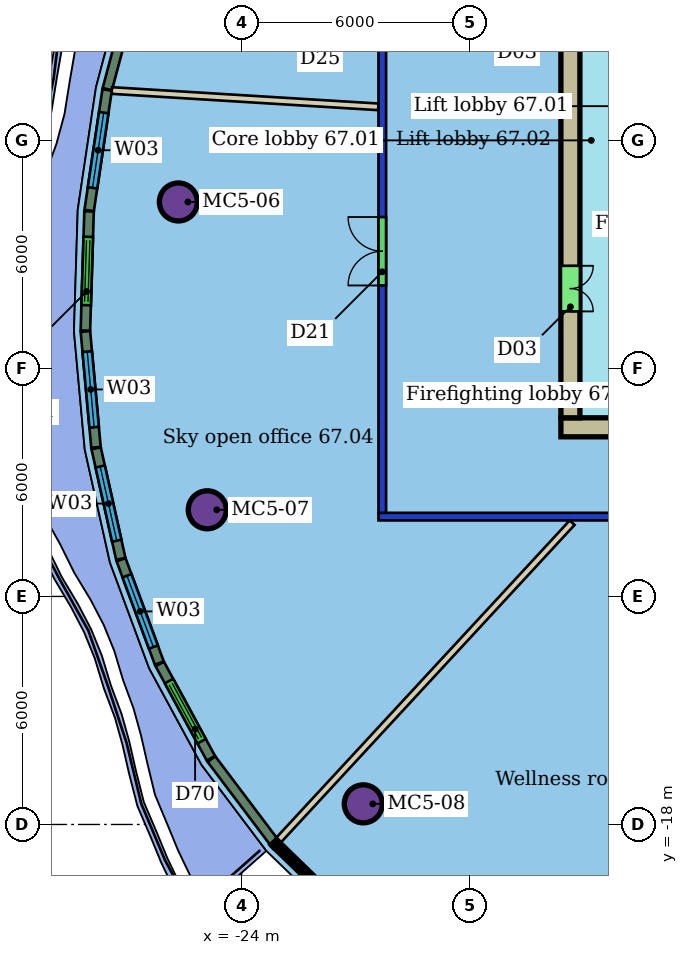
"""IFC4 building model, lengths in metres.
Left out: names, types, materials, properties, quantities, classifications, styles, units other than length and angle.
Written with IfcOpenShell. Run it as: python <this file> out.ifc"""

import sys

from ifc_helpers import new_model, si_unit, direction, frame, frame_2d, origin, origin_2d, place, context, subcontext, project, spatial, rectangle, hollow_circle, extrude, element, fill, save


model = new_model("IFC4")
c1 = context("Model", 3, precision=1e-05, world=origin(), true_north=direction((0.0, 1.0)))
c2 = subcontext(c1, "Body", "Model", "MODEL_VIEW")
j1 = project(units=[si_unit("LENGTHUNIT", "METRE"), si_unit("PLANEANGLEUNIT", "RADIAN")], contexts=[c1])
p1 = place(None, origin())
s1 = spatial("IfcSite", under=j1, at=p1, CompositionType="ELEMENT")
p2 = place(p1, origin())
s2 = spatial("IfcBuilding", under=s1, at=p2, CompositionType="ELEMENT")
p3 = place(p2, frame((0.0, 0.0, 272.1)))
s3 = spatial("IfcBuildingStorey", under=s2, at=p3, CompositionType="ELEMENT", Elevation=272.1)
for number, where, z_axis, x_axis in (
    (1, (-25.666, -1.62, 0.0), (0.0, 0.0, 1.0), (1.0, 0.0, 0.0)),
    (2, (-24.906, -9.72, 0.0), (0.0, 0.0, 1.0), (1.0, 0.0, 0.0)),
    (3, (-20.8, -17.457, 0.0), (0.0, 0.0, 1.0), (1.0, 0.0, 0.0)),
):
    element("IfcColumn", number, at=place(p3, frame(where, z_axis=z_axis, x_axis=x_axis)), inside=s3, PredefinedType="COLUMN", context=c2, shape_type="SweptSolid", body=[
        extrude(hollow_circle(Radius=0.5, WallThickness=0.04, at=origin_2d()), origin(), (0.0, 0.0, 1.0), 3.45),
    ])
p4 = place(p3, frame((8.4, -9.9, 0.0), z_axis=(0.0, 0.0, 1.0), x_axis=(-1.0, 0.0, 0.0)))
e4 = element("IfcWall", 4, at=p4, inside=s3, PredefinedType="PARTITIONING", context=c2, shape_type="SweptSolid", body=[
    extrude(rectangle(XDim=28.8, YDim=0.2, at=frame_2d((14.4, 0.0))), origin(), (0.0, 0.0, 1.0), 3.1),
])
p5 = place(p4, frame((18.521, 0.0, 0.0)))
e5 = element("IfcOpeningElement", 5, at=p5, cuts=e4, PredefinedType="OPENING", context=c2, shape_type="SweptSolid", body=[
    extrude(rectangle(XDim=1.0, YDim=2.1, at=frame_2d((0.5, 1.05))), frame((0.0, 0.11, 0.0), z_axis=(0.0, -1.0, 0.0), x_axis=(1.0, 0.0, 0.0)), (0.0, 0.0, 1.0), 0.22),
])
p6 = place(p4, frame((14.61, 0.0, 0.0)))
e6 = element("IfcOpeningElement", 6, at=p6, cuts=e4, PredefinedType="OPENING", context=c2, shape_type="SweptSolid", body=[
    extrude(rectangle(XDim=0.9, YDim=2.1, at=frame_2d((0.45, 1.05))), frame((0.0, 0.11, 0.0), z_axis=(0.0, -1.0, 0.0), x_axis=(1.0, 0.0, 0.0)), (0.0, 0.0, 1.0), 0.22),
])
p7 = place(p4, frame((9.347, 0.0, 0.0)))
e7 = element("IfcOpeningElement", 7, at=p7, cuts=e4, PredefinedType="OPENING", context=c2, shape_type="SweptSolid", body=[
    extrude(rectangle(XDim=1.0, YDim=2.1, at=frame_2d((0.5, 1.05))), frame((0.0, 0.11, 0.0), z_axis=(0.0, -1.0, 0.0), x_axis=(1.0, 0.0, 0.0)), (0.0, 0.0, 1.0), 0.22),
])
p8 = place(p4, frame((4.363, 0.0, 0.0)))
e8 = element("IfcOpeningElement", 8, at=p8, cuts=e4, PredefinedType="OPENING", context=c2, shape_type="SweptSolid", body=[
    extrude(rectangle(XDim=1.5, YDim=2.1, at=frame_2d((0.75, 1.05))), frame((0.0, 0.11, 0.0), z_axis=(0.0, -1.0, 0.0), x_axis=(1.0, 0.0, 0.0)), (0.0, 0.0, 1.0), 0.22),
])
p9 = place(p3, frame((-20.3, -9.8, 0.0), z_axis=(0.0, 0.0, 1.0), x_axis=(0.0, 1.0, 0.0)))
e9 = element("IfcWall", 9, at=p9, inside=s3, PredefinedType="PARTITIONING", context=c2, shape_type="SweptSolid", body=[
    extrude(rectangle(XDim=19.6, YDim=0.2, at=frame_2d((9.8, 0.0))), origin(), (0.0, 0.0, 1.0), 3.1),
])
p10 = place(p9, frame((13.142, 0.0, 0.0)))
e10 = element("IfcOpeningElement", 10, at=p10, cuts=e9, PredefinedType="OPENING", context=c2, shape_type="SweptSolid", body=[
    extrude(rectangle(XDim=1.5, YDim=2.4, at=frame_2d((0.75, 1.2))), frame((0.0, 0.11, 0.0), z_axis=(0.0, -1.0, 0.0), x_axis=(1.0, 0.0, 0.0)), (0.0, 0.0, 1.0), 0.22),
])
p11 = place(p9, frame((5.982, 0.0, 0.0)))
e11 = element("IfcOpeningElement", 11, at=p11, cuts=e9, PredefinedType="OPENING", context=c2, shape_type="SweptSolid", body=[
    extrude(rectangle(XDim=1.8, YDim=2.1, at=frame_2d((0.9, 1.05))), frame((0.0, 0.11, 0.0), z_axis=(0.0, -1.0, 0.0), x_axis=(1.0, 0.0, 0.0)), (0.0, 0.0, 1.0), 0.22),
])
p12 = place(p3, frame((-27.417, 1.312, 0.0), z_axis=(0.0, 0.0, 1.0), x_axis=(0.998129692202, -0.061131968265, 0.0)))
e12 = element("IfcWall", 12, at=p12, inside=s3, PredefinedType="PARTITIONING", context=c2, shape_type="SweptSolid", body=[
    extrude(rectangle(XDim=7.025, YDim=0.175, at=frame_2d((3.512, 0.0))), origin(), (0.0, 0.0, 1.0), 3.45),
])
p13 = place(p3, frame((-23.031, -18.413, 0.0), z_axis=(0.0, 0.0, 1.0), x_axis=(0.679011342159, 0.734127779899, 0.0)))
e13 = element("IfcWall", 13, at=p13, inside=s3, PredefinedType="PARTITIONING", context=c2, shape_type="SweptSolid", body=[
    extrude(rectangle(XDim=11.379, YDim=0.175, at=frame_2d((5.69, 0.0))), origin(), (0.0, 0.0, 1.0), 3.45),
])
p14 = place(p3, frame((-26.708, 4.456, 0.0), z_axis=(0.0, 0.0, 1.0), x_axis=(-0.257776035016, -0.96620469662, 0.0)))
e14 = element("IfcWall", 14, at=p14, inside=s3, PredefinedType="SOLIDWALL", context=c2, shape_type="SweptSolid", body=[
    extrude(rectangle(XDim=3.216, YDim=0.25, at=frame_2d((1.608, 0.0))), origin(), (0.0, 0.0, 1.0), 3.15),
])
p15 = place(p3, frame((-27.541, 1.326, 0.0), z_axis=(0.0, 0.0, 1.0), x_axis=(-0.147409564434, -0.989075538224, 0.0)))
e15 = element("IfcWall", 15, at=p15, inside=s3, PredefinedType="SOLIDWALL", context=c2, shape_type="SweptSolid", body=[
    extrude(rectangle(XDim=3.206, YDim=0.25, at=frame_2d((1.603, 0.0))), origin(), (0.0, 0.0, 1.0), 3.15),
])
p16 = place(p15, frame((0.603, 0.0, 0.9)))
e16 = element("IfcOpeningElement", 16, at=p16, cuts=e15, PredefinedType="OPENING", context=c2, shape_type="SweptSolid", body=[
    extrude(rectangle(XDim=2.0, YDim=2.1, at=frame_2d((1.0, 1.05))), frame((0.0, 0.135, 0.0), z_axis=(0.0, -1.0, 0.0), x_axis=(1.0, 0.0, 0.0)), (0.0, 0.0, 1.0), 0.27),
])
p17 = place(p3, frame((-28.016, -1.868, 0.0), z_axis=(0.0, 0.0, 1.0), x_axis=(-0.031030800892, -0.999518428743, 0.0)))
e17 = element("IfcWall", 17, at=p17, inside=s3, PredefinedType="SOLIDWALL", context=c2, shape_type="SweptSolid", body=[
    extrude(rectangle(XDim=3.139, YDim=0.25, at=frame_2d((1.57, 0.0))), origin(), (0.0, 0.0, 1.0), 3.15),
])
p18 = place(p17, frame((0.67, 0.0, 0.0)))
e18 = element("IfcOpeningElement", 18, at=p18, cuts=e17, PredefinedType="OPENING", context=c2, shape_type="SweptSolid", body=[
    extrude(rectangle(XDim=1.8, YDim=2.4, at=frame_2d((0.9, 1.2))), frame((0.0, 0.135, 0.0), z_axis=(0.0, -1.0, 0.0), x_axis=(1.0, 0.0, 0.0)), (0.0, 0.0, 1.0), 0.27),
])
p19 = place(p3, frame((-28.112, -5.029, 0.0), z_axis=(0.0, 0.0, 1.0), x_axis=(0.090974263514, -0.995853243896, 0.0)))
e19 = element("IfcWall", 19, at=p19, inside=s3, PredefinedType="SOLIDWALL", context=c2, shape_type="SweptSolid", body=[
    extrude(rectangle(XDim=3.062, YDim=0.25, at=frame_2d((1.531, 0.0))), origin(), (0.0, 0.0, 1.0), 3.15),
])
p20 = place(p19, frame((0.531, 0.0, 0.9)))
e20 = element("IfcOpeningElement", 20, at=p20, cuts=e19, PredefinedType="OPENING", context=c2, shape_type="SweptSolid", body=[
    extrude(rectangle(XDim=2.0, YDim=2.1, at=frame_2d((1.0, 1.05))), frame((0.0, 0.135, 0.0), z_axis=(0.0, -1.0, 0.0), x_axis=(1.0, 0.0, 0.0)), (0.0, 0.0, 1.0), 0.27),
])
p21 = place(p3, frame((-27.83, -8.102, 0.0), z_axis=(0.0, 0.0, 1.0), x_axis=(0.217728327431, -0.976009413599, 0.0)))
e21 = element("IfcWall", 21, at=p21, inside=s3, PredefinedType="SOLIDWALL", context=c2, shape_type="SweptSolid", body=[
    extrude(rectangle(XDim=2.98, YDim=0.25, at=frame_2d((1.49, 0.0))), origin(), (0.0, 0.0, 1.0), 3.15),
])
p22 = place(p21, frame((0.49, 0.0, 0.9)))
e22 = element("IfcOpeningElement", 22, at=p22, cuts=e21, PredefinedType="OPENING", context=c2, shape_type="SweptSolid", body=[
    extrude(rectangle(XDim=2.0, YDim=2.1, at=frame_2d((1.0, 1.05))), frame((0.0, 0.135, 0.0), z_axis=(0.0, -1.0, 0.0), x_axis=(1.0, 0.0, 0.0)), (0.0, 0.0, 1.0), 0.27),
])
p23 = place(p3, frame((-27.174, -11.034, 0.0), z_axis=(0.0, 0.0, 1.0), x_axis=(0.347382924833, -0.937723361943, 0.0)))
e23 = element("IfcWall", 23, at=p23, inside=s3, PredefinedType="SOLIDWALL", context=c2, shape_type="SweptSolid", body=[
    extrude(rectangle(XDim=2.899, YDim=0.25, at=frame_2d((1.45, 0.0))), origin(), (0.0, 0.0, 1.0), 3.15),
])
p24 = place(p23, frame((0.449, 0.0, 0.9)))
e24 = element("IfcOpeningElement", 24, at=p24, cuts=e23, PredefinedType="OPENING", context=c2, shape_type="SweptSolid", body=[
    extrude(rectangle(XDim=2.0, YDim=2.1, at=frame_2d((1.0, 1.05))), frame((0.0, 0.135, 0.0), z_axis=(0.0, -1.0, 0.0), x_axis=(1.0, 0.0, 0.0)), (0.0, 0.0, 1.0), 0.27),
])
p25 = place(p3, frame((-26.156, -13.776, 0.0), z_axis=(0.0, 0.0, 1.0), x_axis=(0.476845701511, -0.878987017509, 0.0)))
e25 = element("IfcWall", 25, at=p25, inside=s3, PredefinedType="SOLIDWALL", context=c2, shape_type="SweptSolid", body=[
    extrude(rectangle(XDim=2.824, YDim=0.25, at=frame_2d((1.412, 0.0))), origin(), (0.0, 0.0, 1.0), 3.15),
])
p26 = place(p25, frame((0.512, 0.0, 0.0)))
e26 = element("IfcOpeningElement", 26, at=p26, cuts=e25, PredefinedType="OPENING", context=c2, shape_type="SweptSolid", body=[
    extrude(rectangle(XDim=1.8, YDim=2.4, at=frame_2d((0.9, 1.2))), frame((0.0, 0.135, 0.0), z_axis=(0.0, -1.0, 0.0), x_axis=(1.0, 0.0, 0.0)), (0.0, 0.0, 1.0), 0.27),
])
p27 = place(p3, frame((-24.796, -16.281, 0.0), z_axis=(0.0, 0.0, 1.0), x_axis=(0.602094992284, -0.798424461215, 0.0)))
e27 = element("IfcWall", 27, at=p27, inside=s3, PredefinedType="SOLIDWALL", context=c2, shape_type="SweptSolid", body=[
    extrude(rectangle(XDim=2.719, YDim=0.25, at=frame_2d((1.36, 0.0))), origin(), (0.0, 0.0, 1.0), 3.15),
])
p28 = place(p3, frame((-15.6, -7.55, 0.0), z_axis=(0.0, 0.0, 1.0), x_axis=(1.0, 0.0, 0.0)))
e28 = element("IfcWall", 28, at=p28, inside=s3, PredefinedType="SHEAR", context=c2, shape_type="SweptSolid", body=[
    extrude(rectangle(XDim=19.2, YDim=0.5, at=frame_2d((9.6, 0.0))), origin(), (0.0, 0.0, 1.0), 3.3),
])
p29 = place(p28, frame((3.6, 0.0, 0.0)))
e29 = element("IfcOpeningElement", 29, at=p29, cuts=e28, PredefinedType="OPENING", context=c2, shape_type="SweptSolid", body=[
    extrude(rectangle(XDim=1.2, YDim=2.1, at=frame_2d((0.6, 1.05))), frame((0.0, 0.26, 0.0), z_axis=(0.0, -1.0, 0.0), x_axis=(1.0, 0.0, 0.0)), (0.0, 0.0, 1.0), 0.52),
])
p30 = place(p3, frame((-15.35, 7.3, 0.0), z_axis=(0.0, 0.0, 1.0), x_axis=(0.0, -1.0, 0.0)))
e30 = element("IfcWall", 30, at=p30, inside=s3, PredefinedType="SHEAR", context=c2, shape_type="SweptSolid", body=[
    extrude(rectangle(XDim=14.6, YDim=0.5, at=frame_2d((7.3, 0.0))), origin(), (0.0, 0.0, 1.0), 3.3),
])
p31 = place(p30, frame((10.6, 0.0, 0.0)))
e31 = element("IfcOpeningElement", 31, at=p31, cuts=e30, PredefinedType="OPENING", context=c2, shape_type="SweptSolid", body=[
    extrude(rectangle(XDim=1.2, YDim=2.1, at=frame_2d((0.6, 1.05))), frame((0.0, 0.26, 0.0), z_axis=(0.0, -1.0, 0.0), x_axis=(1.0, 0.0, 0.0)), (0.0, 0.0, 1.0), 0.52),
])
p32 = place(p30, frame((2.8, 0.0, 0.0)))
e32 = element("IfcOpeningElement", 32, at=p32, cuts=e30, PredefinedType="OPENING", context=c2, shape_type="SweptSolid", body=[
    extrude(rectangle(XDim=1.2, YDim=2.1, at=frame_2d((0.6, 1.05))), frame((0.0, 0.26, 0.0), z_axis=(0.0, -1.0, 0.0), x_axis=(1.0, 0.0, 0.0)), (0.0, 0.0, 1.0), 0.52),
])
p33 = place(p11, origin())
e33 = element("IfcDoor", 33, at=p33, inside=s3, OperationType="DOUBLE_DOOR_SINGLE_SWING", PredefinedType="DOOR", context=c2, shape_type="SweptSolid", body=[
    extrude(rectangle(XDim=1.8, YDim=2.1, at=frame_2d((0.9, 1.05))), frame((0.0, 0.025, 0.0), z_axis=(0.0, -1.0, 0.0), x_axis=(1.0, 0.0, 0.0)), (0.0, 0.0, 1.0), 0.05),
])
fill(e11, e33)
p34 = place(p16, origin())
e34 = element("IfcWindow", 34, at=p34, inside=s3, PartitioningType="SINGLE_PANEL", PredefinedType="WINDOW", context=c2, shape_type="SweptSolid", body=[
    extrude(rectangle(XDim=2.0, YDim=2.1, at=frame_2d((1.0, 1.05))), frame((0.0, 0.03, 0.0), z_axis=(0.0, -1.0, 0.0), x_axis=(1.0, 0.0, 0.0)), (0.0, 0.0, 1.0), 0.06),
])
fill(e16, e34)
p35 = place(p18, origin())
e35 = element("IfcDoor", 35, at=p35, inside=s3, OperationType="DOUBLE_DOOR_SLIDING", PredefinedType="DOOR", context=c2, shape_type="SweptSolid", body=[
    extrude(rectangle(XDim=1.8, YDim=2.4, at=frame_2d((0.9, 1.2))), frame((0.0, 0.025, 0.0), z_axis=(0.0, -1.0, 0.0), x_axis=(1.0, 0.0, 0.0)), (0.0, 0.0, 1.0), 0.05),
])
fill(e18, e35)
p36 = place(p20, origin())
e36 = element("IfcWindow", 36, at=p36, inside=s3, PartitioningType="SINGLE_PANEL", PredefinedType="WINDOW", context=c2, shape_type="SweptSolid", body=[
    extrude(rectangle(XDim=2.0, YDim=2.1, at=frame_2d((1.0, 1.05))), frame((0.0, 0.03, 0.0), z_axis=(0.0, -1.0, 0.0), x_axis=(1.0, 0.0, 0.0)), (0.0, 0.0, 1.0), 0.06),
])
fill(e20, e36)
p37 = place(p22, origin())
e37 = element("IfcWindow", 37, at=p37, inside=s3, PartitioningType="SINGLE_PANEL", PredefinedType="WINDOW", context=c2, shape_type="SweptSolid", body=[
    extrude(rectangle(XDim=2.0, YDim=2.1, at=frame_2d((1.0, 1.05))), frame((0.0, 0.03, 0.0), z_axis=(0.0, -1.0, 0.0), x_axis=(1.0, 0.0, 0.0)), (0.0, 0.0, 1.0), 0.06),
])
fill(e22, e37)
p38 = place(p24, origin())
e38 = element("IfcWindow", 38, at=p38, inside=s3, PartitioningType="SINGLE_PANEL", PredefinedType="WINDOW", context=c2, shape_type="SweptSolid", body=[
    extrude(rectangle(XDim=2.0, YDim=2.1, at=frame_2d((1.0, 1.05))), frame((0.0, 0.03, 0.0), z_axis=(0.0, -1.0, 0.0), x_axis=(1.0, 0.0, 0.0)), (0.0, 0.0, 1.0), 0.06),
])
fill(e24, e38)
p39 = place(p26, origin())
e39 = element("IfcDoor", 39, at=p39, inside=s3, OperationType="DOUBLE_DOOR_SLIDING", PredefinedType="DOOR", context=c2, shape_type="SweptSolid", body=[
    extrude(rectangle(XDim=1.8, YDim=2.4, at=frame_2d((0.9, 1.2))), frame((0.0, 0.025, 0.0), z_axis=(0.0, -1.0, 0.0), x_axis=(1.0, 0.0, 0.0)), (0.0, 0.0, 1.0), 0.05),
])
fill(e26, e39)
p40 = place(p31, origin())
e40 = element("IfcDoor", 40, at=p40, inside=s3, OperationType="DOUBLE_DOOR_SINGLE_SWING", PredefinedType="NOTDEFINED", context=c2, shape_type="SweptSolid", body=[
    extrude(rectangle(XDim=1.2, YDim=2.1, at=frame_2d((0.6, 1.05))), frame((0.0, 0.025, 0.0), z_axis=(0.0, -1.0, 0.0), x_axis=(1.0, 0.0, 0.0)), (0.0, 0.0, 1.0), 0.05),
])
fill(e31, e40)
save(model, sys.argv[1])
